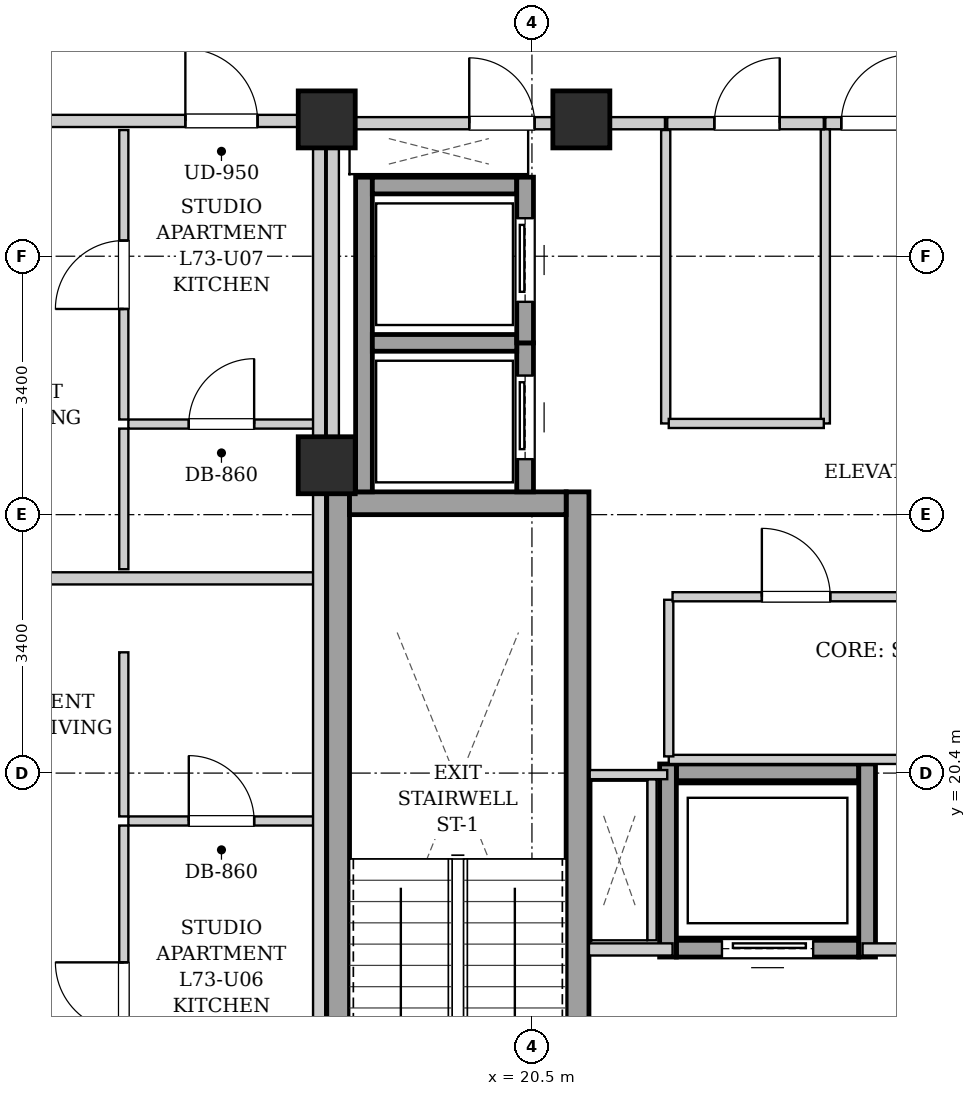
"""IFC4 building model, lengths in metres.
Left out: names, types, materials, properties, quantities, classifications, styles, units other than length and angle.
Written with IfcOpenShell. Run it as: python <this file> out.ifc"""

import sys

from ifc_helpers import new_model, si_unit, direction, frame, frame_2d, origin, origin_2d, place, context, subcontext, project, spatial, rectangle, extrude, element, fill, save


model = new_model("IFC4")
c1 = context("Model", 3, precision=1e-05, world=origin(), true_north=direction((0.0, 1.0)))
c2 = subcontext(c1, "Body", "Model", "MODEL_VIEW")
j1 = project(units=[si_unit("LENGTHUNIT", "METRE"), si_unit("PLANEANGLEUNIT", "RADIAN")], contexts=[c1])
p1 = place(None, origin())
s1 = spatial("IfcSite", under=j1, at=p1, CompositionType="ELEMENT")
p2 = place(p1, origin())
s2 = spatial("IfcBuilding", under=s1, at=p2, CompositionType="ELEMENT")
p3 = place(p2, frame((0.0, 0.0, 251.3)))
s3 = spatial("IfcBuildingStorey", under=s2, at=p3, CompositionType="ELEMENT", Elevation=251.3)
for number, where, z_axis, x_axis in (
    (1, (17.8, 29.0, 0.0), (0.0, 0.0, 1.0), (1.0, 0.0, 0.0)),
    (2, (21.15, 29.0, 0.0), (0.0, 0.0, 1.0), (1.0, 0.0, 0.0)),
    (3, (17.8, 24.45, 0.0), (0.0, 0.0, 1.0), (1.0, 0.0, 0.0)),
):
    element("IfcColumn", number, at=place(p3, frame(where, z_axis=z_axis, x_axis=x_axis)), inside=s3, PredefinedType="COLUMN", context=c2, shape_type="SweptSolid", body=[
        extrude(rectangle(XDim=0.75, YDim=0.75, at=origin_2d()), origin(), (0.0, 0.0, 1.0), 3.4),
    ])
for number, where, z_axis, x_axis in (
    (4, (17.95, 15.1, 0.0), (0.0, 0.0, 1.0), (0.0, 1.0, 0.0)),
    (5, (21.1, 15.1, 0.0), (0.0, 0.0, 1.0), (0.0, 1.0, 0.0)),
):
    element("IfcWall", number, at=place(p3, frame(where, z_axis=z_axis, x_axis=x_axis)), inside=s3, PredefinedType="SHEAR", context=c2, shape_type="SweptSolid", body=[
        extrude(rectangle(XDim=9.0, YDim=0.3, at=frame_2d((4.5, 0.0))), origin(), (0.0, 0.0, 1.0), 3.14),
    ])
p4 = place(p3, frame((18.1, 23.95, 0.0), z_axis=(0.0, 0.0, 1.0), x_axis=(1.0, 0.0, 0.0)))
e6 = element("IfcWall", 6, at=p4, inside=s3, PredefinedType="SHEAR", context=c2, shape_type="SweptSolid", body=[
    extrude(rectangle(XDim=2.85, YDim=0.3, at=frame_2d((1.425, 0.0))), origin(), (0.0, 0.0, 1.0), 3.14),
])
p5 = place(p3, frame((18.29, 24.1, 0.0), z_axis=(0.0, 0.0, 1.0), x_axis=(0.0, 1.0, 0.0)))
e7 = element("IfcWall", 7, at=p5, inside=s3, PredefinedType="SHEAR", context=c2, shape_type="SweptSolid", body=[
    extrude(rectangle(XDim=4.14, YDim=0.22, at=frame_2d((2.07, 0.0))), origin(), (0.0, 0.0, 1.0), 3.14),
])
p6 = place(p3, frame((20.41, 24.1, 0.0), z_axis=(0.0, 0.0, 1.0), x_axis=(0.0, 1.0, 0.0)))
e8 = element("IfcWall", 8, at=p6, inside=s3, PredefinedType="SHEAR", context=c2, shape_type="SweptSolid", body=[
    extrude(rectangle(XDim=1.96, YDim=0.22, at=frame_2d((0.98, 0.0))), origin(), (0.0, 0.0, 1.0), 3.14),
])
p7 = place(p6, frame((0.43, 0.0, 0.0)))
e9 = element("IfcOpeningElement", 9, at=p7, cuts=e8, PredefinedType="OPENING", context=c2, shape_type="SweptSolid", body=[
    extrude(rectangle(XDim=1.1, YDim=2.15, at=frame_2d((0.55, 1.075))), frame((0.0, 0.12, 0.0), z_axis=(0.0, -1.0, 0.0), x_axis=(1.0, 0.0, 0.0)), (0.0, 0.0, 1.0), 0.24),
])
for number, where, z_axis, x_axis in (
    (10, (18.4, 26.06, 0.0), (0.0, 0.0, 1.0), (1.0, 0.0, 0.0)),
    (11, (18.4, 28.13, 0.0), (0.0, 0.0, 1.0), (1.0, 0.0, 0.0)),
):
    element("IfcWall", number, at=place(p3, frame(where, z_axis=z_axis, x_axis=x_axis)), inside=s3, PredefinedType="SHEAR", context=c2, shape_type="SweptSolid", body=[
        extrude(rectangle(XDim=1.9, YDim=0.22, at=frame_2d((0.95, 0.0))), origin(), (0.0, 0.0, 1.0), 3.14),
    ])
p8 = place(p3, frame((20.41, 26.06, 0.0), z_axis=(0.0, 0.0, 1.0), x_axis=(0.0, 1.0, 0.0)))
e12 = element("IfcWall", 12, at=p8, inside=s3, PredefinedType="SHEAR", context=c2, shape_type="SweptSolid", body=[
    extrude(rectangle(XDim=2.18, YDim=0.22, at=frame_2d((1.09, 0.0))), origin(), (0.0, 0.0, 1.0), 3.14),
])
p9 = place(p8, frame((0.54, 0.0, 0.0)))
e13 = element("IfcOpeningElement", 13, at=p9, cuts=e12, PredefinedType="OPENING", context=c2, shape_type="SweptSolid", body=[
    extrude(rectangle(XDim=1.1, YDim=2.15, at=frame_2d((0.55, 1.075))), frame((0.0, 0.12, 0.0), z_axis=(0.0, -1.0, 0.0), x_axis=(1.0, 0.0, 0.0)), (0.0, 0.0, 1.0), 0.24),
])
p10 = place(p3, frame((22.4, 18.09, 0.0), z_axis=(0.0, 0.0, 1.0), x_axis=(1.0, 0.0, 0.0)))
e14 = element("IfcWall", 14, at=p10, inside=s3, PredefinedType="SHEAR", context=c2, shape_type="SweptSolid", body=[
    extrude(rectangle(XDim=2.4, YDim=0.22, at=frame_2d((1.2, 0.0))), origin(), (0.0, 0.0, 1.0), 3.14),
])
p11 = place(p10, frame((0.6, 0.0, 0.0)))
e15 = element("IfcOpeningElement", 15, at=p11, cuts=e14, PredefinedType="OPENING", context=c2, shape_type="SweptSolid", body=[
    extrude(rectangle(XDim=1.2, YDim=2.15, at=frame_2d((0.6, 1.075))), frame((0.0, 0.12, 0.0), z_axis=(0.0, -1.0, 0.0), x_axis=(1.0, 0.0, 0.0)), (0.0, 0.0, 1.0), 0.24),
])
p12 = place(p3, frame((22.4, 20.41, 0.0), z_axis=(0.0, 0.0, 1.0), x_axis=(1.0, 0.0, 0.0)))
e16 = element("IfcWall", 16, at=p12, inside=s3, PredefinedType="SHEAR", context=c2, shape_type="SweptSolid", body=[
    extrude(rectangle(XDim=2.4, YDim=0.22, at=frame_2d((1.2, 0.0))), origin(), (0.0, 0.0, 1.0), 3.14),
])
for number, where, z_axis, x_axis in (
    (17, (22.29, 17.98, 0.0), (0.0, 0.0, 1.0), (0.0, 1.0, 0.0)),
    (18, (24.91, 17.98, 0.0), (0.0, 0.0, 1.0), (0.0, 1.0, 0.0)),
):
    element("IfcWall", number, at=place(p3, frame(where, z_axis=z_axis, x_axis=x_axis)), inside=s3, PredefinedType="SHEAR", context=c2, shape_type="SweptSolid", body=[
        extrude(rectangle(XDim=2.54, YDim=0.22, at=frame_2d((1.27, 0.0))), origin(), (0.0, 0.0, 1.0), 3.14),
    ])
p13 = place(p3, frame((21.25, 18.08, 0.0), z_axis=(0.0, 0.0, 1.0), x_axis=(1.0, 0.0, 0.0)))
e19 = element("IfcWall", 19, at=p13, inside=s3, PredefinedType="PARTITIONING", context=c2, shape_type="SweptSolid", body=[
    extrude(rectangle(XDim=1.1, YDim=0.16, at=frame_2d((0.55, 0.0))), origin(), (0.0, 0.0, 1.0), 3.14),
])
p14 = place(p3, frame((24.85, 18.08, 0.0), z_axis=(0.0, 0.0, 1.0), x_axis=(1.0, 0.0, 0.0)))
e20 = element("IfcWall", 20, at=p14, inside=s3, PredefinedType="PARTITIONING", context=c2, shape_type="SweptSolid", body=[
    extrude(rectangle(XDim=1.3, YDim=0.16, at=frame_2d((0.65, 0.0))), origin(), (0.0, 0.0, 1.0), 3.14),
])
p15 = place(p3, frame((17.88, 24.12, 0.0), z_axis=(0.0, 0.0, 1.0), x_axis=(0.0, 1.0, 0.0)))
e21 = element("IfcWall", 21, at=p15, inside=s3, PredefinedType="PARTITIONING", context=c2, shape_type="SweptSolid", body=[
    extrude(rectangle(XDim=4.76, YDim=0.16, at=frame_2d((2.38, 0.0))), origin(), (0.0, 0.0, 1.0), 3.14),
])
p16 = place(p3, frame((24.36, 28.95, 0.0), z_axis=(0.0, 0.0, 1.0), x_axis=(1.0, 0.0, 0.0)))
e22 = element("IfcWall", 22, at=p16, inside=s3, PredefinedType="PARTITIONING", context=c2, shape_type="SweptSolid", body=[
    extrude(rectangle(XDim=1.32, YDim=0.16, at=frame_2d((0.66, 0.0))), origin(), (0.0, 0.0, 1.0), 2.668),
])
p17 = place(p16, frame((0.21, 0.0, 0.0)))
e23 = element("IfcOpeningElement", 23, at=p17, cuts=e22, PredefinedType="OPENING", context=c2, shape_type="SweptSolid", body=[
    extrude(rectangle(XDim=0.9, YDim=2.05, at=frame_2d((0.45, 1.025))), frame((0.0, 0.09, 0.0), z_axis=(0.0, -1.0, 0.0), x_axis=(1.0, 0.0, 0.0)), (0.0, 0.0, 1.0), 0.18),
])
p18 = place(p3, frame((17.96, 28.95, 0.0), z_axis=(0.0, 0.0, 1.0), x_axis=(1.0, 0.0, 0.0)))
e24 = element("IfcWall", 24, at=p18, inside=s3, PredefinedType="PARTITIONING", context=c2, shape_type="SweptSolid", body=[
    extrude(rectangle(XDim=4.29, YDim=0.16, at=frame_2d((2.145, 0.0))), origin(), (0.0, 0.0, 1.0), 2.668),
])
p19 = place(p18, frame((1.715, 0.0, 0.0)))
e25 = element("IfcOpeningElement", 25, at=p19, cuts=e24, PredefinedType="OPENING", context=c2, shape_type="SweptSolid", body=[
    extrude(rectangle(XDim=0.86, YDim=2.05, at=frame_2d((0.43, 1.025))), frame((0.0, 0.09, 0.0), z_axis=(0.0, -1.0, 0.0), x_axis=(1.0, 0.0, 0.0)), (0.0, 0.0, 1.0), 0.18),
])
p20 = place(p3, frame((22.08, 18.2, 0.0), z_axis=(0.0, 0.0, 1.0), x_axis=(0.0, 1.0, 0.0)))
e26 = element("IfcWall", 26, at=p20, inside=s3, PredefinedType="PARTITIONING", context=c2, shape_type="SweptSolid", body=[
    extrude(rectangle(XDim=2.12, YDim=0.12, at=frame_2d((1.06, 0.0))), origin(), (0.0, 0.0, 1.0), 3.14),
])
p21 = place(p3, frame((22.28, 20.38, 0.0), z_axis=(0.0, 0.0, 1.0), x_axis=(-1.0, 0.0, 0.0)))
e27 = element("IfcWall", 27, at=p21, inside=s3, PredefinedType="PARTITIONING", context=c2, shape_type="SweptSolid", body=[
    extrude(rectangle(XDim=1.02, YDim=0.12, at=frame_2d((0.51, 0.0))), origin(), (0.0, 0.0, 1.0), 3.14),
])
p22 = place(p3, frame((24.36, 25.0, 0.0), z_axis=(0.0, 0.0, 1.0), x_axis=(0.0, 1.0, 0.0)))
e28 = element("IfcWall", 28, at=p22, inside=s3, PredefinedType="PARTITIONING", context=c2, shape_type="SweptSolid", body=[
    extrude(rectangle(XDim=3.87, YDim=0.12, at=frame_2d((1.935, 0.0))), origin(), (0.0, 0.0, 1.0), 3.14),
])
p23 = place(p3, frame((22.26, 25.0, 0.0), z_axis=(0.0, 0.0, 1.0), x_axis=(0.0, 1.0, 0.0)))
e29 = element("IfcWall", 29, at=p23, inside=s3, PredefinedType="PARTITIONING", context=c2, shape_type="SweptSolid", body=[
    extrude(rectangle(XDim=3.86, YDim=0.12, at=frame_2d((1.93, 0.0))), origin(), (0.0, 0.0, 1.0), 3.14),
])
p24 = place(p3, frame((22.3, 25.0, 0.0), z_axis=(0.0, 0.0, 1.0), x_axis=(1.0, 0.0, 0.0)))
e30 = element("IfcWall", 30, at=p24, inside=s3, PredefinedType="PARTITIONING", context=c2, shape_type="SweptSolid", body=[
    extrude(rectangle(XDim=2.04, YDim=0.12, at=frame_2d((1.02, 0.0))), origin(), (0.0, 0.0, 1.0), 3.14),
])
p25 = place(p3, frame((22.28, 28.95, 0.0), z_axis=(0.0, 0.0, 1.0), x_axis=(1.0, 0.0, 0.0)))
e31 = element("IfcWall", 31, at=p25, inside=s3, PredefinedType="PARTITIONING", context=c2, shape_type="SweptSolid", body=[
    extrude(rectangle(XDim=2.06, YDim=0.16, at=frame_2d((1.03, 0.0))), origin(), (0.0, 0.0, 1.0), 2.668),
])
p26 = place(p25, frame((0.62, 0.0, 0.0)))
e32 = element("IfcOpeningElement", 32, at=p26, cuts=e31, PredefinedType="OPENING", context=c2, shape_type="SweptSolid", body=[
    extrude(rectangle(XDim=0.86, YDim=2.05, at=frame_2d((0.43, 1.025))), frame((0.0, 0.09, 0.0), z_axis=(0.0, -1.0, 0.0), x_axis=(1.0, 0.0, 0.0)), (0.0, 0.0, 1.0), 0.18),
])
p27 = place(p3, frame((22.3, 20.58, 0.0), z_axis=(0.0, 0.0, 1.0), x_axis=(1.0, 0.0, 0.0)))
e33 = element("IfcWall", 33, at=p27, inside=s3, PredefinedType="PARTITIONING", context=c2, shape_type="SweptSolid", body=[
    extrude(rectangle(XDim=7.35, YDim=0.12, at=frame_2d((3.675, 0.0))), origin(), (0.0, 0.0, 1.0), 3.14),
])
p28 = place(p3, frame((22.3, 20.62, 0.0), z_axis=(0.0, 0.0, 1.0), x_axis=(0.0, 1.0, 0.0)))
e34 = element("IfcWall", 34, at=p28, inside=s3, PredefinedType="PARTITIONING", context=c2, shape_type="SweptSolid", body=[
    extrude(rectangle(XDim=2.06, YDim=0.12, at=frame_2d((1.03, 0.0))), origin(), (0.0, 0.0, 1.0), 3.14),
])
p29 = place(p3, frame((22.35, 22.72, 0.0), z_axis=(0.0, 0.0, 1.0), x_axis=(1.0, 0.0, 0.0)))
e35 = element("IfcWall", 35, at=p29, inside=s3, PredefinedType="PARTITIONING", context=c2, shape_type="SweptSolid", body=[
    extrude(rectangle(XDim=7.27, YDim=0.12, at=frame_2d((3.635, 0.0))), origin(), (0.0, 0.0, 1.0), 3.14),
])
p30 = place(p29, frame((1.175, 0.0, 0.0)))
e36 = element("IfcOpeningElement", 36, at=p30, cuts=e35, PredefinedType="OPENING", context=c2, shape_type="SweptSolid", body=[
    extrude(rectangle(XDim=0.9, YDim=2.05, at=frame_2d((0.45, 1.025))), frame((0.0, 0.07, 0.0), z_axis=(0.0, -1.0, 0.0), x_axis=(1.0, 0.0, 0.0)), (0.0, 0.0, 1.0), 0.14),
])
p31 = place(p29, frame((4.725, 0.0, 0.0)))
e37 = element("IfcOpeningElement", 37, at=p31, cuts=e35, PredefinedType="OPENING", context=c2, shape_type="SweptSolid", body=[
    extrude(rectangle(XDim=0.9, YDim=2.05, at=frame_2d((0.45, 1.025))), frame((0.0, 0.07, 0.0), z_axis=(0.0, -1.0, 0.0), x_axis=(1.0, 0.0, 0.0)), (0.0, 0.0, 1.0), 0.14),
])
p32 = place(p3, frame((10.88, 22.962, 0.0), z_axis=(0.0, 0.0, 1.0), x_axis=(1.0, 0.0, 0.0)))
e38 = element("IfcWall", 38, at=p32, inside=s3, PredefinedType="PARTITIONING", context=c2, shape_type="SweptSolid", body=[
    extrude(rectangle(XDim=6.76, YDim=0.16, at=frame_2d((3.38, 0.0))), origin(), (0.0, 0.0, 1.0), 3.14),
])
p33 = place(p3, frame((15.19, 19.77, 0.0), z_axis=(0.0, 0.0, 1.0), x_axis=(1.0, 0.0, 0.0)))
e39 = element("IfcWall", 39, at=p33, inside=s3, PredefinedType="PARTITIONING", context=c2, shape_type="SweptSolid", body=[
    extrude(rectangle(XDim=2.45, YDim=0.12, at=frame_2d((1.225, 0.0))), origin(), (0.0, 0.0, 1.0), 3.14),
])
p34 = place(p33, frame((0.795, 0.0, 0.0)))
e40 = element("IfcOpeningElement", 40, at=p34, cuts=e39, PredefinedType="OPENING", context=c2, shape_type="SweptSolid", body=[
    extrude(rectangle(XDim=0.86, YDim=2.05, at=frame_2d((0.43, 1.025))), frame((0.0, 0.07, 0.0), z_axis=(0.0, -1.0, 0.0), x_axis=(1.0, 0.0, 0.0)), (0.0, 0.0, 1.0), 0.14),
])
p35 = place(p3, frame((15.13, 19.83, 0.0), z_axis=(0.0, 0.0, 1.0), x_axis=(0.0, 1.0, 0.0)))
e41 = element("IfcWall", 41, at=p35, inside=s3, PredefinedType="PARTITIONING", context=c2, shape_type="SweptSolid", body=[
    extrude(rectangle(XDim=2.159, YDim=0.12, at=frame_2d((1.08, 0.0))), origin(), (0.0, 0.0, 1.0), 3.14),
])
p36 = place(p3, frame((15.13, 15.21, 0.0), z_axis=(0.0, 0.0, 1.0), x_axis=(0.0, 1.0, 0.0)))
e42 = element("IfcWall", 42, at=p36, inside=s3, PredefinedType="PARTITIONING", context=c2, shape_type="SweptSolid", body=[
    extrude(rectangle(XDim=4.5, YDim=0.12, at=frame_2d((2.25, 0.0))), origin(), (0.0, 0.0, 1.0), 3.14),
])
p37 = place(p36, frame((1.8, 0.0, 0.0)))
e43 = element("IfcOpeningElement", 43, at=p37, cuts=e42, PredefinedType="OPENING", context=c2, shape_type="SweptSolid", body=[
    extrude(rectangle(XDim=0.9, YDim=2.05, at=frame_2d((0.45, 1.025))), frame((0.0, 0.07, 0.0), z_axis=(0.0, -1.0, 0.0), x_axis=(1.0, 0.0, 0.0)), (0.0, 0.0, 1.0), 0.14),
])
p38 = place(p3, frame((10.88, 28.98, 0.0), z_axis=(0.0, 0.0, 1.0), x_axis=(1.0, 0.0, 0.0)))
e44 = element("IfcWall", 44, at=p38, inside=s3, PredefinedType="PARTITIONING", context=c2, shape_type="SweptSolid", body=[
    extrude(rectangle(XDim=6.88, YDim=0.16, at=frame_2d((3.44, 0.0))), origin(), (0.0, 0.0, 1.0), 2.668),
])
p39 = place(p38, frame((5.06, 0.0, 0.0)))
e45 = element("IfcOpeningElement", 45, at=p39, cuts=e44, PredefinedType="OPENING", context=c2, shape_type="SweptSolid", body=[
    extrude(rectangle(XDim=0.95, YDim=2.1, at=frame_2d((0.475, 1.05))), frame((0.0, 0.09, 0.0), z_axis=(0.0, -1.0, 0.0), x_axis=(1.0, 0.0, 0.0)), (0.0, 0.0, 1.0), 0.18),
])
p40 = place(p3, frame((15.19, 24.992, 0.0), z_axis=(0.0, 0.0, 1.0), x_axis=(1.0, 0.0, 0.0)))
e46 = element("IfcWall", 46, at=p40, inside=s3, PredefinedType="PARTITIONING", context=c2, shape_type="SweptSolid", body=[
    extrude(rectangle(XDim=2.45, YDim=0.12, at=frame_2d((1.225, 0.0))), origin(), (0.0, 0.0, 1.0), 3.14),
])
p41 = place(p40, frame((0.795, 0.0, 0.0)))
e47 = element("IfcOpeningElement", 47, at=p41, cuts=e46, PredefinedType="OPENING", context=c2, shape_type="SweptSolid", body=[
    extrude(rectangle(XDim=0.86, YDim=2.05, at=frame_2d((0.43, 1.025))), frame((0.0, 0.07, 0.0), z_axis=(0.0, -1.0, 0.0), x_axis=(1.0, 0.0, 0.0)), (0.0, 0.0, 1.0), 0.14),
])
p42 = place(p3, frame((15.13, 23.082, 0.0), z_axis=(0.0, 0.0, 1.0), x_axis=(0.0, 1.0, 0.0)))
e48 = element("IfcWall", 48, at=p42, inside=s3, PredefinedType="PARTITIONING", context=c2, shape_type="SweptSolid", body=[
    extrude(rectangle(XDim=1.85, YDim=0.12, at=frame_2d((0.925, 0.0))), origin(), (0.0, 0.0, 1.0), 3.14),
])
p43 = place(p3, frame((15.13, 25.052, 0.0), z_axis=(0.0, 0.0, 1.0), x_axis=(0.0, 1.0, 0.0)))
e49 = element("IfcWall", 49, at=p43, inside=s3, PredefinedType="PARTITIONING", context=c2, shape_type="SweptSolid", body=[
    extrude(rectangle(XDim=3.808, YDim=0.12, at=frame_2d((1.904, 0.0))), origin(), (0.0, 0.0, 1.0), 3.14),
])
p44 = place(p43, frame((1.454, 0.0, 0.0)))
e50 = element("IfcOpeningElement", 50, at=p44, cuts=e49, PredefinedType="OPENING", context=c2, shape_type="SweptSolid", body=[
    extrude(rectangle(XDim=0.9, YDim=2.05, at=frame_2d((0.45, 1.025))), frame((0.0, 0.07, 0.0), z_axis=(0.0, -1.0, 0.0), x_axis=(1.0, 0.0, 0.0)), (0.0, 0.0, 1.0), 0.14),
])
p45 = place(p3, frame((17.7, 15.02, 0.0), z_axis=(0.0, 0.0, 1.0), x_axis=(0.0, 1.0, 0.0)))
e51 = element("IfcWall", 51, at=p45, inside=s3, PredefinedType="PARTITIONING", context=c2, shape_type="SweptSolid", body=[
    extrude(rectangle(XDim=13.98, YDim=0.16, at=frame_2d((6.99, 0.0))), origin(), (0.0, 0.0, 1.0), 3.14),
])
p46 = place(p7, origin())
e52 = element("IfcDoor", 52, at=p46, inside=s3, OperationType="SLIDING_TO_LEFT", PredefinedType="DOOR", context=c2, shape_type="SweptSolid", body=[
    extrude(rectangle(XDim=1.1, YDim=2.15, at=frame_2d((0.55, 1.075))), frame((0.0, 0.025, 0.0), z_axis=(0.0, -1.0, 0.0), x_axis=(1.0, 0.0, 0.0)), (0.0, 0.0, 1.0), 0.05),
])
fill(e9, e52)
p47 = place(p9, origin())
e53 = element("IfcDoor", 53, at=p47, inside=s3, OperationType="SLIDING_TO_LEFT", PredefinedType="DOOR", context=c2, shape_type="SweptSolid", body=[
    extrude(rectangle(XDim=1.1, YDim=2.15, at=frame_2d((0.55, 1.075))), frame((0.0, 0.025, 0.0), z_axis=(0.0, -1.0, 0.0), x_axis=(1.0, 0.0, 0.0)), (0.0, 0.0, 1.0), 0.05),
])
fill(e13, e53)
p48 = place(p11, origin())
e54 = element("IfcDoor", 54, at=p48, inside=s3, OperationType="SLIDING_TO_LEFT", PredefinedType="DOOR", context=c2, shape_type="SweptSolid", body=[
    extrude(rectangle(XDim=1.2, YDim=2.15, at=frame_2d((0.6, 1.075))), frame((0.0, 0.025, 0.0), z_axis=(0.0, -1.0, 0.0), x_axis=(1.0, 0.0, 0.0)), (0.0, 0.0, 1.0), 0.05),
])
fill(e15, e54)
p49 = place(p17, origin())
e55 = element("IfcDoor", 55, at=p49, inside=s3, OperationType="SINGLE_SWING_RIGHT", PredefinedType="DOOR", context=c2, shape_type="SweptSolid", body=[
    extrude(rectangle(XDim=0.9, YDim=2.05, at=frame_2d((0.45, 1.025))), frame((0.0, 0.025, 0.0), z_axis=(0.0, -1.0, 0.0), x_axis=(1.0, 0.0, 0.0)), (0.0, 0.0, 1.0), 0.05),
])
fill(e23, e55)
p50 = place(p19, origin())
e56 = element("IfcDoor", 56, at=p50, inside=s3, OperationType="SINGLE_SWING_LEFT", PredefinedType="DOOR", context=c2, shape_type="SweptSolid", body=[
    extrude(rectangle(XDim=0.86, YDim=2.05, at=frame_2d((0.43, 1.025))), frame((0.0, 0.025, 0.0), z_axis=(0.0, -1.0, 0.0), x_axis=(1.0, 0.0, 0.0)), (0.0, 0.0, 1.0), 0.05),
])
fill(e25, e56)
p51 = place(p26, origin())
e57 = element("IfcDoor", 57, at=p51, inside=s3, OperationType="SINGLE_SWING_RIGHT", PredefinedType="DOOR", context=c2, shape_type="SweptSolid", body=[
    extrude(rectangle(XDim=0.86, YDim=2.05, at=frame_2d((0.43, 1.025))), frame((0.0, 0.025, 0.0), z_axis=(0.0, -1.0, 0.0), x_axis=(1.0, 0.0, 0.0)), (0.0, 0.0, 1.0), 0.05),
])
fill(e32, e57)
p52 = place(p30, origin())
e58 = element("IfcDoor", 58, at=p52, inside=s3, OperationType="SINGLE_SWING_LEFT", PredefinedType="DOOR", context=c2, shape_type="SweptSolid", body=[
    extrude(rectangle(XDim=0.9, YDim=2.05, at=frame_2d((0.45, 1.025))), frame((0.0, 0.025, 0.0), z_axis=(0.0, -1.0, 0.0), x_axis=(1.0, 0.0, 0.0)), (0.0, 0.0, 1.0), 0.05),
])
fill(e36, e58)
p53 = place(p34, origin())
e59 = element("IfcDoor", 59, at=p53, inside=s3, OperationType="SINGLE_SWING_LEFT", PredefinedType="DOOR", context=c2, shape_type="SweptSolid", body=[
    extrude(rectangle(XDim=0.86, YDim=2.05, at=frame_2d((0.43, 1.025))), frame((0.0, 0.025, 0.0), z_axis=(0.0, -1.0, 0.0), x_axis=(1.0, 0.0, 0.0)), (0.0, 0.0, 1.0), 0.05),
])
fill(e40, e59)
p54 = place(p37, origin())
e60 = element("IfcDoor", 60, at=p54, inside=s3, OperationType="SINGLE_SWING_RIGHT", PredefinedType="DOOR", context=c2, shape_type="SweptSolid", body=[
    extrude(rectangle(XDim=0.9, YDim=2.05, at=frame_2d((0.45, 1.025))), frame((0.0, 0.025, 0.0), z_axis=(0.0, -1.0, 0.0), x_axis=(1.0, 0.0, 0.0)), (0.0, 0.0, 1.0), 0.05),
])
fill(e43, e60)
p55 = place(p39, origin())
e61 = element("IfcDoor", 61, at=p55, inside=s3, OperationType="SINGLE_SWING_LEFT", PredefinedType="DOOR", context=c2, shape_type="SweptSolid", body=[
    extrude(rectangle(XDim=0.95, YDim=2.1, at=frame_2d((0.475, 1.05))), frame((0.0, 0.025, 0.0), z_axis=(0.0, -1.0, 0.0), x_axis=(1.0, 0.0, 0.0)), (0.0, 0.0, 1.0), 0.05),
])
fill(e45, e61)
p56 = place(p41, origin())
e62 = element("IfcDoor", 62, at=p56, inside=s3, OperationType="SINGLE_SWING_RIGHT", PredefinedType="DOOR", context=c2, shape_type="SweptSolid", body=[
    extrude(rectangle(XDim=0.86, YDim=2.05, at=frame_2d((0.43, 1.025))), frame((0.0, 0.025, 0.0), z_axis=(0.0, -1.0, 0.0), x_axis=(1.0, 0.0, 0.0)), (0.0, 0.0, 1.0), 0.05),
])
fill(e47, e62)
p57 = place(p44, origin())
e63 = element("IfcDoor", 63, at=p57, inside=s3, OperationType="SINGLE_SWING_LEFT", PredefinedType="DOOR", context=c2, shape_type="SweptSolid", body=[
    extrude(rectangle(XDim=0.9, YDim=2.05, at=frame_2d((0.45, 1.025))), frame((0.0, 0.025, 0.0), z_axis=(0.0, -1.0, 0.0), x_axis=(1.0, 0.0, 0.0)), (0.0, 0.0, 1.0), 0.05),
])
fill(e50, e63)
save(model, sys.argv[1])
